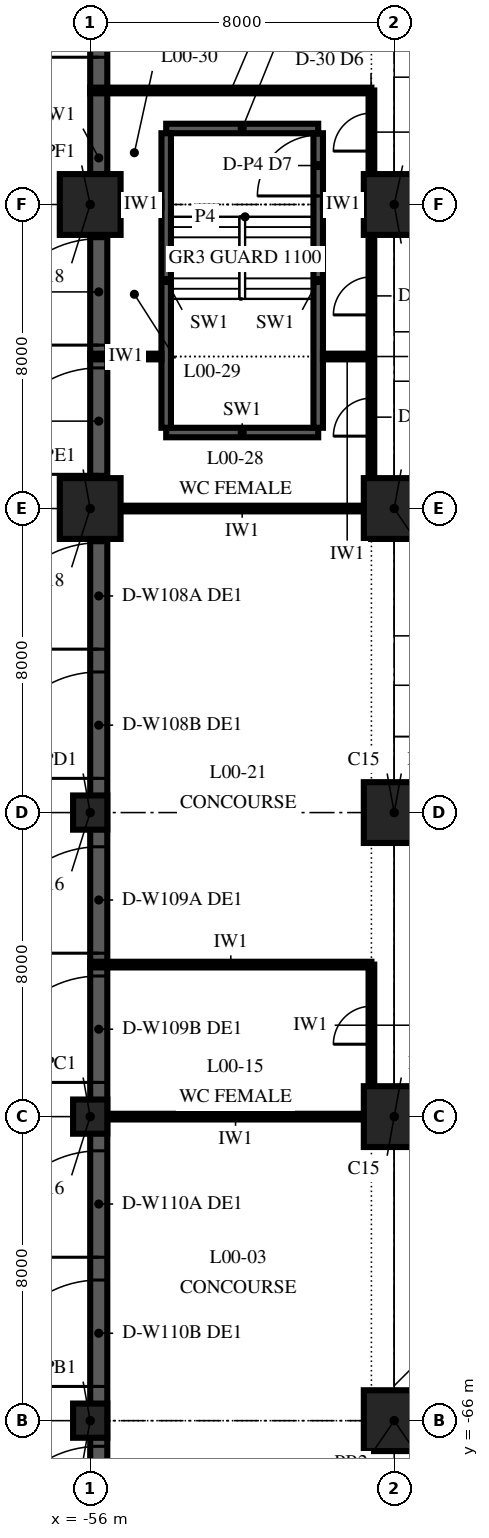
"""IFC4 building model, lengths in metres.
Left out: names, types, materials, properties, quantities, classifications, styles, units other than length and angle.
Written with IfcOpenShell. Run it as: python <this file> out.ifc"""

import sys

from ifc_helpers import new_model, si_unit, direction, frame, frame_2d, origin, origin_2d, place, context, subcontext, project, spatial, rectangle, extrude, element, fill, save


model = new_model("IFC4")
c1 = context("Model", 3, precision=1e-05, world=origin(), true_north=direction((0.0, 1.0)))
c2 = subcontext(c1, "Body", "Model", "MODEL_VIEW")
j1 = project(units=[si_unit("LENGTHUNIT", "METRE"), si_unit("PLANEANGLEUNIT", "RADIAN")], contexts=[c1])
p1 = place(None, origin())
s1 = spatial("IfcSite", under=j1, at=p1, CompositionType="ELEMENT")
p2 = place(p1, origin())
s2 = spatial("IfcBuilding", under=s1, at=p2, CompositionType="ELEMENT")
p3 = place(p2, origin())
s3 = spatial("IfcBuildingStorey", under=s2, at=p3, CompositionType="ELEMENT", Elevation=0.0)
for number, where, z_axis, x_axis in (
    (1, (-56.0, -66.0, 0.0), (0.0, 0.0, 1.0), (1.0, 0.0, 0.0)),
    (2, (-56.0, -58.0, 0.0), (0.0, 0.0, 1.0), (1.0, 0.0, 0.0)),
    (3, (-56.0, -50.0, 0.0), (0.0, 0.0, 1.0), (1.0, 0.0, 0.0)),
):
    element("IfcColumn", number, at=place(p3, frame(where, z_axis=z_axis, x_axis=x_axis)), inside=s3, PredefinedType="COLUMN", context=c2, shape_type="SweptSolid", body=[
        extrude(rectangle(XDim=0.9, YDim=0.9, at=origin_2d()), origin(), (0.0, 0.0, 1.0), 6.0),
    ])
for number, where, z_axis, x_axis in (
    (4, (-56.0, -42.0, 0.0), (0.0, 0.0, 1.0), (1.0, 0.0, 0.0)),
    (5, (-56.0, -34.0, 0.0), (0.0, 0.0, 1.0), (1.0, 0.0, 0.0)),
    (6, (-48.0, -66.0, 0.0), (0.0, 0.0, 1.0), (1.0, 0.0, 0.0)),
    (7, (-48.0, -58.0, 0.0), (0.0, 0.0, 1.0), (1.0, 0.0, 0.0)),
    (8, (-48.0, -50.0, 0.0), (0.0, 0.0, 1.0), (1.0, 0.0, 0.0)),
    (9, (-48.0, -42.0, 0.0), (0.0, 0.0, 1.0), (1.0, 0.0, 0.0)),
    (10, (-48.0, -34.0, 0.0), (0.0, 0.0, 1.0), (1.0, 0.0, 0.0)),
):
    element("IfcColumn", number, at=place(p3, frame(where, z_axis=z_axis, x_axis=x_axis)), inside=s3, PredefinedType="COLUMN", context=c2, shape_type="SweptSolid", body=[
        extrude(rectangle(XDim=1.6, YDim=1.6, at=origin_2d()), origin(), (0.0, 0.0, 1.0), 6.0),
    ])
p4 = place(p3, frame((-55.775, 8.0, 0.0), z_axis=(0.0, 0.0, 1.0), x_axis=(0.0, -1.0, 0.0)))
e11 = element("IfcWall", 11, at=p4, inside=s3, PredefinedType="SOLIDWALL", context=c2, shape_type="SweptSolid", body=[
    extrude(rectangle(XDim=81.55, YDim=0.45, at=frame_2d((40.775, 0.0))), origin(), (0.0, 0.0, 1.0), 6.0),
])
p5 = place(p4, frame((2.9, 0.0, 0.0)))
e12 = element("IfcOpeningElement", 12, at=p5, cuts=e11, PredefinedType="OPENING", context=c2, shape_type="SweptSolid", body=[
    extrude(rectangle(XDim=2.8, YDim=2.4, at=frame_2d((1.4, 1.2))), frame((0.0, 0.24, 0.0), z_axis=(0.0, -1.0, 0.0), x_axis=(1.0, 0.0, 0.0)), (0.0, 0.0, 1.0), 0.48),
])
p6 = place(p4, frame((6.3, 0.0, 0.0)))
e13 = element("IfcOpeningElement", 13, at=p6, cuts=e11, PredefinedType="OPENING", context=c2, shape_type="SweptSolid", body=[
    extrude(rectangle(XDim=2.8, YDim=2.4, at=frame_2d((1.4, 1.2))), frame((0.0, 0.24, 0.0), z_axis=(0.0, -1.0, 0.0), x_axis=(1.0, 0.0, 0.0)), (0.0, 0.0, 1.0), 0.48),
])
p7 = place(p4, frame((10.9, 0.0, 0.0)))
e14 = element("IfcOpeningElement", 14, at=p7, cuts=e11, PredefinedType="OPENING", context=c2, shape_type="SweptSolid", body=[
    extrude(rectangle(XDim=2.8, YDim=2.4, at=frame_2d((1.4, 1.2))), frame((0.0, 0.24, 0.0), z_axis=(0.0, -1.0, 0.0), x_axis=(1.0, 0.0, 0.0)), (0.0, 0.0, 1.0), 0.48),
])
p8 = place(p4, frame((14.3, 0.0, 0.0)))
e15 = element("IfcOpeningElement", 15, at=p8, cuts=e11, PredefinedType="OPENING", context=c2, shape_type="SweptSolid", body=[
    extrude(rectangle(XDim=2.8, YDim=2.4, at=frame_2d((1.4, 1.2))), frame((0.0, 0.24, 0.0), z_axis=(0.0, -1.0, 0.0), x_axis=(1.0, 0.0, 0.0)), (0.0, 0.0, 1.0), 0.48),
])
p9 = place(p4, frame((18.9, 0.0, 0.0)))
e16 = element("IfcOpeningElement", 16, at=p9, cuts=e11, PredefinedType="OPENING", context=c2, shape_type="SweptSolid", body=[
    extrude(rectangle(XDim=2.8, YDim=2.4, at=frame_2d((1.4, 1.2))), frame((0.0, 0.24, 0.0), z_axis=(0.0, -1.0, 0.0), x_axis=(1.0, 0.0, 0.0)), (0.0, 0.0, 1.0), 0.48),
])
p10 = place(p4, frame((22.3, 0.0, 0.0)))
e17 = element("IfcOpeningElement", 17, at=p10, cuts=e11, PredefinedType="OPENING", context=c2, shape_type="SweptSolid", body=[
    extrude(rectangle(XDim=2.8, YDim=2.4, at=frame_2d((1.4, 1.2))), frame((0.0, 0.24, 0.0), z_axis=(0.0, -1.0, 0.0), x_axis=(1.0, 0.0, 0.0)), (0.0, 0.0, 1.0), 0.48),
])
p11 = place(p4, frame((26.9, 0.0, 0.0)))
e18 = element("IfcOpeningElement", 18, at=p11, cuts=e11, PredefinedType="OPENING", context=c2, shape_type="SweptSolid", body=[
    extrude(rectangle(XDim=2.8, YDim=2.4, at=frame_2d((1.4, 1.2))), frame((0.0, 0.24, 0.0), z_axis=(0.0, -1.0, 0.0), x_axis=(1.0, 0.0, 0.0)), (0.0, 0.0, 1.0), 0.48),
])
p12 = place(p4, frame((30.3, 0.0, 0.0)))
e19 = element("IfcOpeningElement", 19, at=p12, cuts=e11, PredefinedType="OPENING", context=c2, shape_type="SweptSolid", body=[
    extrude(rectangle(XDim=2.8, YDim=2.4, at=frame_2d((1.4, 1.2))), frame((0.0, 0.24, 0.0), z_axis=(0.0, -1.0, 0.0), x_axis=(1.0, 0.0, 0.0)), (0.0, 0.0, 1.0), 0.48),
])
p13 = place(p4, frame((35.325, 0.0, 0.0)))
e20 = element("IfcOpeningElement", 20, at=p13, cuts=e11, PredefinedType="OPENING", context=c2, shape_type="SweptSolid", body=[
    extrude(rectangle(XDim=2.8, YDim=2.4, at=frame_2d((1.4, 1.2))), frame((0.0, 0.24, 0.0), z_axis=(0.0, -1.0, 0.0), x_axis=(1.0, 0.0, 0.0)), (0.0, 0.0, 1.0), 0.48),
])
p14 = place(p4, frame((42.9, 0.0, 0.0)))
e21 = element("IfcOpeningElement", 21, at=p14, cuts=e11, PredefinedType="OPENING", context=c2, shape_type="SweptSolid", body=[
    extrude(rectangle(XDim=2.8, YDim=2.4, at=frame_2d((1.4, 1.2))), frame((0.0, 0.24, 0.0), z_axis=(0.0, -1.0, 0.0), x_axis=(1.0, 0.0, 0.0)), (0.0, 0.0, 1.0), 0.48),
])
p15 = place(p4, frame((46.3, 0.0, 0.0)))
e22 = element("IfcOpeningElement", 22, at=p15, cuts=e11, PredefinedType="OPENING", context=c2, shape_type="SweptSolid", body=[
    extrude(rectangle(XDim=2.8, YDim=2.4, at=frame_2d((1.4, 1.2))), frame((0.0, 0.24, 0.0), z_axis=(0.0, -1.0, 0.0), x_axis=(1.0, 0.0, 0.0)), (0.0, 0.0, 1.0), 0.48),
])
p16 = place(p4, frame((50.9, 0.0, 0.0)))
e23 = element("IfcOpeningElement", 23, at=p16, cuts=e11, PredefinedType="OPENING", context=c2, shape_type="SweptSolid", body=[
    extrude(rectangle(XDim=2.8, YDim=2.4, at=frame_2d((1.4, 1.2))), frame((0.0, 0.24, 0.0), z_axis=(0.0, -1.0, 0.0), x_axis=(1.0, 0.0, 0.0)), (0.0, 0.0, 1.0), 0.48),
])
p17 = place(p4, frame((54.3, 0.0, 0.0)))
e24 = element("IfcOpeningElement", 24, at=p17, cuts=e11, PredefinedType="OPENING", context=c2, shape_type="SweptSolid", body=[
    extrude(rectangle(XDim=2.8, YDim=2.4, at=frame_2d((1.4, 1.2))), frame((0.0, 0.24, 0.0), z_axis=(0.0, -1.0, 0.0), x_axis=(1.0, 0.0, 0.0)), (0.0, 0.0, 1.0), 0.48),
])
p18 = place(p4, frame((58.9, 0.0, 0.0)))
e25 = element("IfcOpeningElement", 25, at=p18, cuts=e11, PredefinedType="OPENING", context=c2, shape_type="SweptSolid", body=[
    extrude(rectangle(XDim=2.8, YDim=2.4, at=frame_2d((1.4, 1.2))), frame((0.0, 0.24, 0.0), z_axis=(0.0, -1.0, 0.0), x_axis=(1.0, 0.0, 0.0)), (0.0, 0.0, 1.0), 0.48),
])
p19 = place(p4, frame((62.3, 0.0, 0.0)))
e26 = element("IfcOpeningElement", 26, at=p19, cuts=e11, PredefinedType="OPENING", context=c2, shape_type="SweptSolid", body=[
    extrude(rectangle(XDim=2.8, YDim=2.4, at=frame_2d((1.4, 1.2))), frame((0.0, 0.24, 0.0), z_axis=(0.0, -1.0, 0.0), x_axis=(1.0, 0.0, 0.0)), (0.0, 0.0, 1.0), 0.48),
])
p20 = place(p4, frame((66.9, 0.0, 0.0)))
e27 = element("IfcOpeningElement", 27, at=p20, cuts=e11, PredefinedType="OPENING", context=c2, shape_type="SweptSolid", body=[
    extrude(rectangle(XDim=2.8, YDim=2.4, at=frame_2d((1.4, 1.2))), frame((0.0, 0.24, 0.0), z_axis=(0.0, -1.0, 0.0), x_axis=(1.0, 0.0, 0.0)), (0.0, 0.0, 1.0), 0.48),
])
p21 = place(p4, frame((70.3, 0.0, 0.0)))
e28 = element("IfcOpeningElement", 28, at=p21, cuts=e11, PredefinedType="OPENING", context=c2, shape_type="SweptSolid", body=[
    extrude(rectangle(XDim=2.8, YDim=2.4, at=frame_2d((1.4, 1.2))), frame((0.0, 0.24, 0.0), z_axis=(0.0, -1.0, 0.0), x_axis=(1.0, 0.0, 0.0)), (0.0, 0.0, 1.0), 0.48),
])
p22 = place(p4, frame((74.675, 0.0, 0.0)))
e29 = element("IfcOpeningElement", 29, at=p22, cuts=e11, PredefinedType="OPENING", context=c2, shape_type="SweptSolid", body=[
    extrude(rectangle(XDim=2.8, YDim=2.4, at=frame_2d((1.4, 1.2))), frame((0.0, 0.24, 0.0), z_axis=(0.0, -1.0, 0.0), x_axis=(1.0, 0.0, 0.0)), (0.0, 0.0, 1.0), 0.48),
])
p23 = place(p4, frame((78.075, 0.0, 0.0)))
e30 = element("IfcOpeningElement", 30, at=p23, cuts=e11, PredefinedType="OPENING", context=c2, shape_type="SweptSolid", body=[
    extrude(rectangle(XDim=2.8, YDim=2.4, at=frame_2d((1.4, 1.2))), frame((0.0, 0.24, 0.0), z_axis=(0.0, -1.0, 0.0), x_axis=(1.0, 0.0, 0.0)), (0.0, 0.0, 1.0), 0.48),
])
for number, where, z_axis, x_axis in (
    (31, (-54.0, -40.0, 0.0), (0.0, 0.0, 1.0), (1.0, 0.0, 0.0)),
    (32, (-50.0, -32.0, 0.0), (0.0, 0.0, 1.0), (-1.0, 0.0, 0.0)),
):
    element("IfcWall", number, at=place(p3, frame(where, z_axis=z_axis, x_axis=x_axis)), inside=s3, PredefinedType="SOLIDWALL", context=c2, shape_type="SweptSolid", body=[
        extrude(rectangle(XDim=4.0, YDim=0.25, at=frame_2d((2.0, 0.0))), origin(), (0.0, 0.0, 1.0), 6.0),
    ])
p24 = place(p3, frame((-50.0, -39.875, 0.0), z_axis=(0.0, 0.0, 1.0), x_axis=(0.0, 1.0, 0.0)))
e33 = element("IfcWall", 33, at=p24, inside=s3, PredefinedType="SOLIDWALL", context=c2, shape_type="SweptSolid", body=[
    extrude(rectangle(XDim=7.75, YDim=0.25, at=frame_2d((3.875, 0.0))), origin(), (0.0, 0.0, 1.0), 6.0),
])
p25 = place(p24, frame((6.1, 0.0, 0.0)))
e34 = element("IfcOpeningElement", 34, at=p25, cuts=e33, PredefinedType="OPENING", context=c2, shape_type="SweptSolid", body=[
    extrude(rectangle(XDim=1.6, YDim=2.1, at=frame_2d((0.8, 1.05))), frame((0.0, 0.14, 0.0), z_axis=(0.0, -1.0, 0.0), x_axis=(1.0, 0.0, 0.0)), (0.0, 0.0, 1.0), 0.28),
])
p26 = place(p3, frame((-54.0, -32.125, 0.0), z_axis=(0.0, 0.0, 1.0), x_axis=(0.0, -1.0, 0.0)))
e35 = element("IfcWall", 35, at=p26, inside=s3, PredefinedType="SOLIDWALL", context=c2, shape_type="SweptSolid", body=[
    extrude(rectangle(XDim=7.75, YDim=0.25, at=frame_2d((3.875, 0.0))), origin(), (0.0, 0.0, 1.0), 6.0),
])
p27 = place(p3, frame((-48.6, -57.19, 0.0), z_axis=(0.0, 0.0, 1.0), x_axis=(0.0, 1.0, 0.0)))
e36 = element("IfcWall", 36, at=p27, inside=s3, PredefinedType="PARTITIONING", context=c2, shape_type="SweptSolid", body=[
    extrude(rectangle(XDim=3.19, YDim=0.15, at=frame_2d((1.595, 0.0))), origin(), (0.0, 0.0, 1.0), 5.7),
])
p28 = place(p27, frame((1.095, 0.0, 0.0)))
e37 = element("IfcOpeningElement", 37, at=p28, cuts=e36, PredefinedType="OPENING", context=c2, shape_type="SweptSolid", body=[
    extrude(rectangle(XDim=1.0, YDim=2.1, at=frame_2d((0.5, 1.05))), frame((0.0, 0.09, 0.0), z_axis=(0.0, -1.0, 0.0), x_axis=(1.0, 0.0, 0.0)), (0.0, 0.0, 1.0), 0.18),
])
p29 = place(p3, frame((-48.6, -41.19, 0.0), z_axis=(0.0, 0.0, 1.0), x_axis=(0.0, 1.0, 0.0)))
e38 = element("IfcWall", 38, at=p29, inside=s3, PredefinedType="PARTITIONING", context=c2, shape_type="SweptSolid", body=[
    extrude(rectangle(XDim=6.38, YDim=0.15, at=frame_2d((3.19, 0.0))), origin(), (0.0, 0.0, 1.0), 5.7),
])
p30 = place(p29, frame((1.095, 0.0, 0.0)))
e39 = element("IfcOpeningElement", 39, at=p30, cuts=e38, PredefinedType="OPENING", context=c2, shape_type="SweptSolid", body=[
    extrude(rectangle(XDim=1.0, YDim=2.1, at=frame_2d((0.5, 1.05))), frame((0.0, 0.09, 0.0), z_axis=(0.0, -1.0, 0.0), x_axis=(1.0, 0.0, 0.0)), (0.0, 0.0, 1.0), 0.18),
])
p31 = place(p29, frame((4.285, 0.0, 0.0)))
e40 = element("IfcOpeningElement", 40, at=p31, cuts=e38, PredefinedType="OPENING", context=c2, shape_type="SweptSolid", body=[
    extrude(rectangle(XDim=1.0, YDim=2.1, at=frame_2d((0.5, 1.05))), frame((0.0, 0.09, 0.0), z_axis=(0.0, -1.0, 0.0), x_axis=(1.0, 0.0, 0.0)), (0.0, 0.0, 1.0), 0.18),
])
p32 = place(p3, frame((-48.6, -33.19, 0.0), z_axis=(0.0, 0.0, 1.0), x_axis=(0.0, 1.0, 0.0)))
e41 = element("IfcWall", 41, at=p32, inside=s3, PredefinedType="PARTITIONING", context=c2, shape_type="SweptSolid", body=[
    extrude(rectangle(XDim=2.19, YDim=0.15, at=frame_2d((1.095, 0.0))), origin(), (0.0, 0.0, 1.0), 5.7),
])
p33 = place(p32, frame((0.595, 0.0, 0.0)))
e42 = element("IfcOpeningElement", 42, at=p33, cuts=e41, PredefinedType="OPENING", context=c2, shape_type="SweptSolid", body=[
    extrude(rectangle(XDim=1.0, YDim=2.1, at=frame_2d((0.5, 1.05))), frame((0.0, 0.09, 0.0), z_axis=(0.0, -1.0, 0.0), x_axis=(1.0, 0.0, 0.0)), (0.0, 0.0, 1.0), 0.18),
])
p34 = place(p3, frame((-55.54, -58.0, 0.0), z_axis=(0.0, 0.0, 1.0), x_axis=(1.0, 0.0, 0.0)))
e43 = element("IfcWall", 43, at=p34, inside=s3, PredefinedType="PARTITIONING", context=c2, shape_type="SweptSolid", body=[
    extrude(rectangle(XDim=6.73, YDim=0.15, at=frame_2d((3.365, 0.0))), origin(), (0.0, 0.0, 1.0), 5.05),
])
p35 = place(p3, frame((-56.0, -54.0, 0.0), z_axis=(0.0, 0.0, 1.0), x_axis=(1.0, 0.0, 0.0)))
e44 = element("IfcWall", 44, at=p35, inside=s3, PredefinedType="PARTITIONING", context=c2, shape_type="SweptSolid", body=[
    extrude(rectangle(XDim=7.4, YDim=0.15, at=frame_2d((3.7, 0.0))), origin(), (0.0, 0.0, 1.0), 5.7),
])
p36 = place(p3, frame((-55.19, -42.0, 0.0), z_axis=(0.0, 0.0, 1.0), x_axis=(1.0, 0.0, 0.0)))
e45 = element("IfcWall", 45, at=p36, inside=s3, PredefinedType="PARTITIONING", context=c2, shape_type="SweptSolid", body=[
    extrude(rectangle(XDim=6.38, YDim=0.15, at=frame_2d((3.19, 0.0))), origin(), (0.0, 0.0, 1.0), 4.1),
])
p37 = place(p3, frame((-56.0, -38.0, 0.0), z_axis=(0.0, 0.0, 1.0), x_axis=(1.0, 0.0, 0.0)))
e46 = element("IfcWall", 46, at=p37, inside=s3, PredefinedType="PARTITIONING", context=c2, shape_type="SweptSolid", body=[
    extrude(rectangle(XDim=1.875, YDim=0.15, at=frame_2d((0.938, 0.0))), origin(), (0.0, 0.0, 1.0), 5.7),
])
p38 = place(p3, frame((-49.875, -38.0, 0.0), z_axis=(0.0, 0.0, 1.0), x_axis=(1.0, 0.0, 0.0)))
e47 = element("IfcWall", 47, at=p38, inside=s3, PredefinedType="PARTITIONING", context=c2, shape_type="SweptSolid", body=[
    extrude(rectangle(XDim=1.275, YDim=0.15, at=frame_2d((0.637, 0.0))), origin(), (0.0, 0.0, 1.0), 5.7),
])
for number, where, z_axis, x_axis in (
    (48, (-55.19, -34.0, 0.0), (0.0, 0.0, 1.0), (1.0, 0.0, 0.0)),
    (49, (-49.875, -34.0, 0.0), (0.0, 0.0, 1.0), (1.0, 0.0, 0.0)),
):
    element("IfcWall", number, at=place(p3, frame(where, z_axis=z_axis, x_axis=x_axis)), inside=s3, PredefinedType="PARTITIONING", context=c2, shape_type="SweptSolid", body=[
        extrude(rectangle(XDim=1.065, YDim=0.15, at=frame_2d((0.532, 0.0))), origin(), (0.0, 0.0, 1.0), 5.7),
    ])
p39 = place(p3, frame((-56.0, -31.0, 0.0), z_axis=(0.0, 0.0, 1.0), x_axis=(1.0, 0.0, 0.0)))
e50 = element("IfcWall", 50, at=p39, inside=s3, PredefinedType="PARTITIONING", context=c2, shape_type="SweptSolid", body=[
    extrude(rectangle(XDim=7.4, YDim=0.15, at=frame_2d((3.7, 0.0))), origin(), (0.0, 0.0, 1.0), 5.7),
])
p40 = place(p13, frame((2.8, 0.0, 0.0), z_axis=(0.0, 0.0, 1.0), x_axis=(-1.0, 0.0, 0.0)))
e51 = element("IfcDoor", 51, at=p40, inside=s3, OperationType="DOUBLE_DOOR_SINGLE_SWING", PredefinedType="DOOR", context=c2, shape_type="SweptSolid", body=[
    extrude(rectangle(XDim=2.8, YDim=2.4, at=frame_2d((1.4, 1.2))), frame((0.0, 0.225, 0.0), z_axis=(0.0, -1.0, 0.0), x_axis=(1.0, 0.0, 0.0)), (0.0, 0.0, 1.0), 0.449),
])
fill(e20, e51)
p41 = place(p14, frame((2.8, 0.0, 0.0), z_axis=(0.0, 0.0, 1.0), x_axis=(-1.0, 0.0, 0.0)))
e52 = element("IfcDoor", 52, at=p41, inside=s3, OperationType="DOUBLE_DOOR_SINGLE_SWING", PredefinedType="DOOR", context=c2, shape_type="SweptSolid", body=[
    extrude(rectangle(XDim=2.8, YDim=2.4, at=frame_2d((1.4, 1.2))), frame((0.0, 0.225, 0.0), z_axis=(0.0, -1.0, 0.0), x_axis=(1.0, 0.0, 0.0)), (0.0, 0.0, 1.0), 0.449),
])
fill(e21, e52)
p42 = place(p15, frame((2.8, 0.0, 0.0), z_axis=(0.0, 0.0, 1.0), x_axis=(-1.0, 0.0, 0.0)))
e53 = element("IfcDoor", 53, at=p42, inside=s3, OperationType="DOUBLE_DOOR_SINGLE_SWING", PredefinedType="DOOR", context=c2, shape_type="SweptSolid", body=[
    extrude(rectangle(XDim=2.8, YDim=2.4, at=frame_2d((1.4, 1.2))), frame((0.0, 0.225, 0.0), z_axis=(0.0, -1.0, 0.0), x_axis=(1.0, 0.0, 0.0)), (0.0, 0.0, 1.0), 0.449),
])
fill(e22, e53)
p43 = place(p16, frame((2.8, 0.0, 0.0), z_axis=(0.0, 0.0, 1.0), x_axis=(-1.0, 0.0, 0.0)))
e54 = element("IfcDoor", 54, at=p43, inside=s3, OperationType="DOUBLE_DOOR_SINGLE_SWING", PredefinedType="DOOR", context=c2, shape_type="SweptSolid", body=[
    extrude(rectangle(XDim=2.8, YDim=2.4, at=frame_2d((1.4, 1.2))), frame((0.0, 0.225, 0.0), z_axis=(0.0, -1.0, 0.0), x_axis=(1.0, 0.0, 0.0)), (0.0, 0.0, 1.0), 0.449),
])
fill(e23, e54)
p44 = place(p17, frame((2.8, 0.0, 0.0), z_axis=(0.0, 0.0, 1.0), x_axis=(-1.0, 0.0, 0.0)))
e55 = element("IfcDoor", 55, at=p44, inside=s3, OperationType="DOUBLE_DOOR_SINGLE_SWING", PredefinedType="DOOR", context=c2, shape_type="SweptSolid", body=[
    extrude(rectangle(XDim=2.8, YDim=2.4, at=frame_2d((1.4, 1.2))), frame((0.0, 0.225, 0.0), z_axis=(0.0, -1.0, 0.0), x_axis=(1.0, 0.0, 0.0)), (0.0, 0.0, 1.0), 0.449),
])
fill(e24, e55)
p45 = place(p18, frame((2.8, 0.0, 0.0), z_axis=(0.0, 0.0, 1.0), x_axis=(-1.0, 0.0, 0.0)))
e56 = element("IfcDoor", 56, at=p45, inside=s3, OperationType="DOUBLE_DOOR_SINGLE_SWING", PredefinedType="DOOR", context=c2, shape_type="SweptSolid", body=[
    extrude(rectangle(XDim=2.8, YDim=2.4, at=frame_2d((1.4, 1.2))), frame((0.0, 0.225, 0.0), z_axis=(0.0, -1.0, 0.0), x_axis=(1.0, 0.0, 0.0)), (0.0, 0.0, 1.0), 0.449),
])
fill(e25, e56)
p46 = place(p19, frame((2.8, 0.0, 0.0), z_axis=(0.0, 0.0, 1.0), x_axis=(-1.0, 0.0, 0.0)))
e57 = element("IfcDoor", 57, at=p46, inside=s3, OperationType="DOUBLE_DOOR_SINGLE_SWING", PredefinedType="DOOR", context=c2, shape_type="SweptSolid", body=[
    extrude(rectangle(XDim=2.8, YDim=2.4, at=frame_2d((1.4, 1.2))), frame((0.0, 0.225, 0.0), z_axis=(0.0, -1.0, 0.0), x_axis=(1.0, 0.0, 0.0)), (0.0, 0.0, 1.0), 0.449),
])
fill(e26, e57)
p47 = place(p20, frame((2.8, 0.0, 0.0), z_axis=(0.0, 0.0, 1.0), x_axis=(-1.0, 0.0, 0.0)))
e58 = element("IfcDoor", 58, at=p47, inside=s3, OperationType="DOUBLE_DOOR_SINGLE_SWING", PredefinedType="DOOR", context=c2, shape_type="SweptSolid", body=[
    extrude(rectangle(XDim=2.8, YDim=2.4, at=frame_2d((1.4, 1.2))), frame((0.0, 0.225, 0.0), z_axis=(0.0, -1.0, 0.0), x_axis=(1.0, 0.0, 0.0)), (0.0, 0.0, 1.0), 0.449),
])
fill(e27, e58)
p48 = place(p21, frame((2.8, 0.0, 0.0), z_axis=(0.0, 0.0, 1.0), x_axis=(-1.0, 0.0, 0.0)))
e59 = element("IfcDoor", 59, at=p48, inside=s3, OperationType="DOUBLE_DOOR_SINGLE_SWING", PredefinedType="DOOR", context=c2, shape_type="SweptSolid", body=[
    extrude(rectangle(XDim=2.8, YDim=2.4, at=frame_2d((1.4, 1.2))), frame((0.0, 0.225, 0.0), z_axis=(0.0, -1.0, 0.0), x_axis=(1.0, 0.0, 0.0)), (0.0, 0.0, 1.0), 0.449),
])
fill(e28, e59)
p49 = place(p22, frame((2.8, 0.0, 0.0), z_axis=(0.0, 0.0, 1.0), x_axis=(-1.0, 0.0, 0.0)))
e60 = element("IfcDoor", 60, at=p49, inside=s3, OperationType="DOUBLE_DOOR_SINGLE_SWING", PredefinedType="DOOR", context=c2, shape_type="SweptSolid", body=[
    extrude(rectangle(XDim=2.8, YDim=2.4, at=frame_2d((1.4, 1.2))), frame((0.0, 0.225, 0.0), z_axis=(0.0, -1.0, 0.0), x_axis=(1.0, 0.0, 0.0)), (0.0, 0.0, 1.0), 0.449),
])
fill(e29, e60)
p50 = place(p25, origin())
e61 = element("IfcDoor", 61, at=p50, inside=s3, OperationType="DOUBLE_DOOR_SINGLE_SWING", PredefinedType="DOOR", context=c2, shape_type="SweptSolid", body=[
    extrude(rectangle(XDim=1.6, YDim=2.1, at=frame_2d((0.8, 1.05))), frame((0.0, 0.125, 0.0), z_axis=(0.0, -1.0, 0.0), x_axis=(1.0, 0.0, 0.0)), (0.0, 0.0, 1.0), 0.25),
])
fill(e34, e61)
p51 = place(p28, origin())
e62 = element("IfcDoor", 62, at=p51, inside=s3, OperationType="SINGLE_SWING_LEFT", PredefinedType="DOOR", context=c2, shape_type="SweptSolid", body=[
    extrude(rectangle(XDim=1.0, YDim=2.1, at=frame_2d((0.5, 1.05))), frame((0.0, 0.075, 0.0), z_axis=(0.0, -1.0, 0.0), x_axis=(1.0, 0.0, 0.0)), (0.0, 0.0, 1.0), 0.149),
])
fill(e37, e62)
p52 = place(p30, origin())
e63 = element("IfcDoor", 63, at=p52, inside=s3, OperationType="SINGLE_SWING_LEFT", PredefinedType="DOOR", context=c2, shape_type="SweptSolid", body=[
    extrude(rectangle(XDim=1.0, YDim=2.1, at=frame_2d((0.5, 1.05))), frame((0.0, 0.075, 0.0), z_axis=(0.0, -1.0, 0.0), x_axis=(1.0, 0.0, 0.0)), (0.0, 0.0, 1.0), 0.149),
])
fill(e39, e63)
p53 = place(p31, origin())
e64 = element("IfcDoor", 64, at=p53, inside=s3, OperationType="SINGLE_SWING_LEFT", PredefinedType="DOOR", context=c2, shape_type="SweptSolid", body=[
    extrude(rectangle(XDim=1.0, YDim=2.1, at=frame_2d((0.5, 1.05))), frame((0.0, 0.075, 0.0), z_axis=(0.0, -1.0, 0.0), x_axis=(1.0, 0.0, 0.0)), (0.0, 0.0, 1.0), 0.149),
])
fill(e40, e64)
p54 = place(p33, origin())
e65 = element("IfcDoor", 65, at=p54, inside=s3, OperationType="SINGLE_SWING_LEFT", PredefinedType="DOOR", context=c2, shape_type="SweptSolid", body=[
    extrude(rectangle(XDim=1.0, YDim=2.1, at=frame_2d((0.5, 1.05))), frame((0.0, 0.075, 0.0), z_axis=(0.0, -1.0, 0.0), x_axis=(1.0, 0.0, 0.0)), (0.0, 0.0, 1.0), 0.149),
])
fill(e42, e65)
save(model, sys.argv[1])
